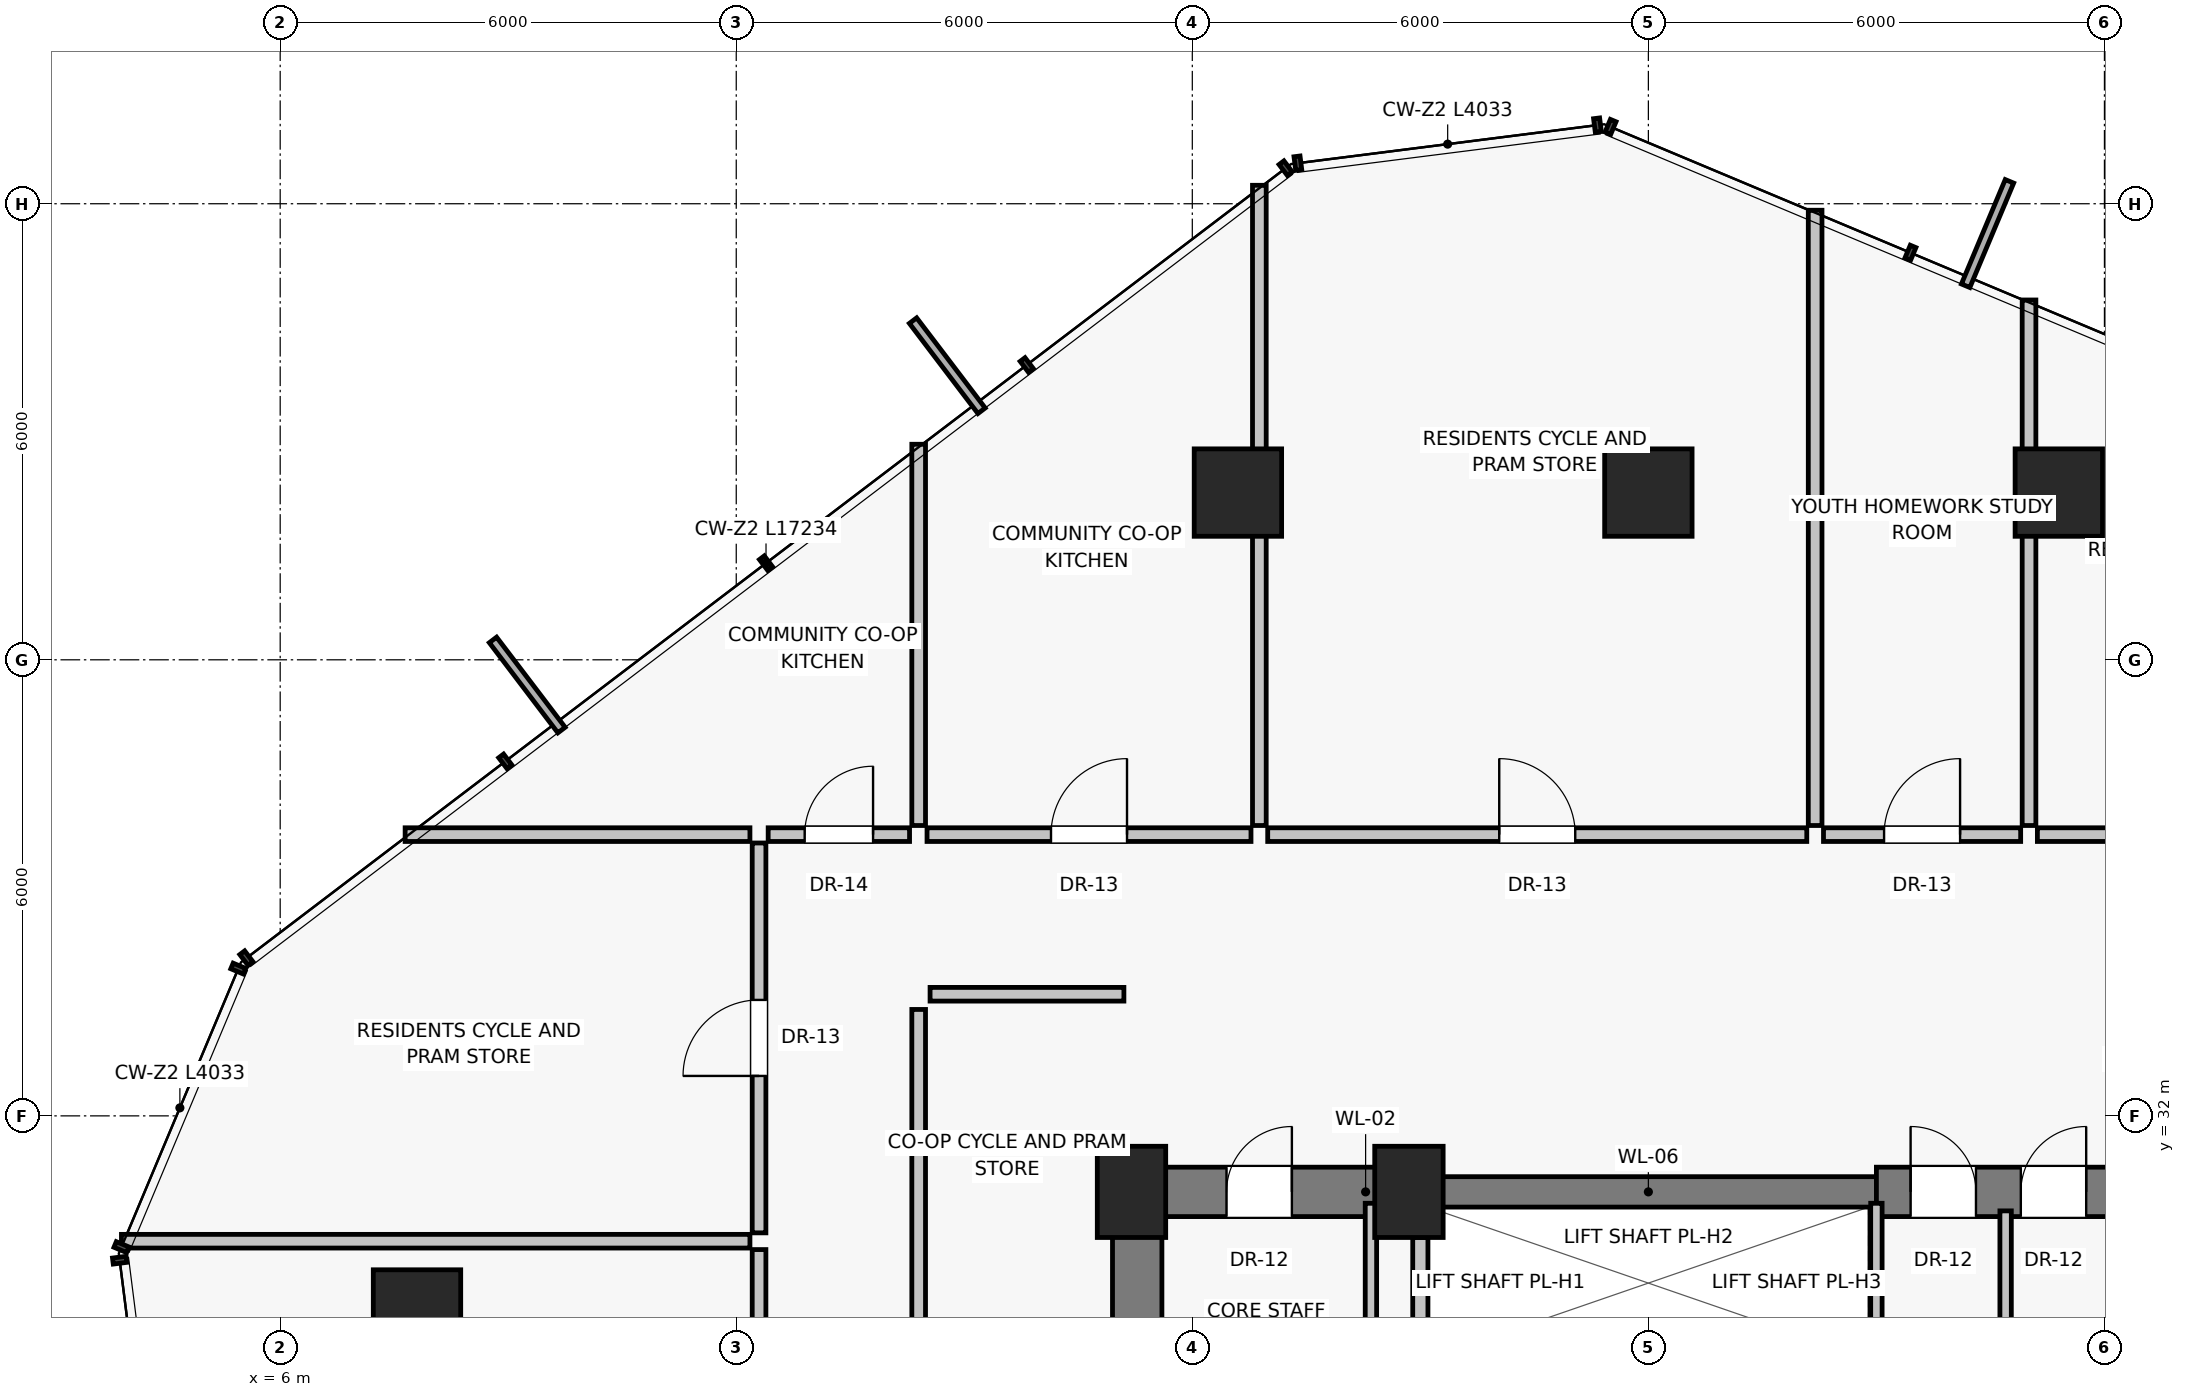
"""IFC4 building model, lengths in metres.
Left out: names, types, materials, properties, quantities, classifications, styles, units other than length and angle.
Written with IfcOpenShell. Run it as: python <this file> out.ifc"""

import sys

from ifc_helpers import new_model, si_unit, direction, frame, frame_2d, origin, origin_2d, place, context, subcontext, project, spatial, rectangle, extrude, source, transform, mapped, element, fill, save


model = new_model("IFC4")
c1 = context("Model", 3, precision=1e-05, world=origin(), true_north=direction((0.0, 1.0)))
c2 = subcontext(c1, "Body", "Model", "MODEL_VIEW")
j1 = project(units=[si_unit("LENGTHUNIT", "METRE"), si_unit("PLANEANGLEUNIT", "RADIAN")], contexts=[c1])
p1 = place(None, origin())
s1 = spatial("IfcSite", under=j1, at=p1, CompositionType="ELEMENT")
p2 = place(p1, origin())
s2 = spatial("IfcBuilding", under=s1, at=p2, CompositionType="ELEMENT")
p3 = place(p2, frame((0.0, 0.0, 152.25)))
s3 = spatial("IfcBuildingStorey", under=s2, at=p3, CompositionType="ELEMENT", Elevation=152.25)
for number, where, z_axis, x_axis in (
    (1, (17.2, 31.0, 0.0), (0.0, 0.0, 1.0), (1.0, 0.0, 0.0)),
    (2, (20.85, 31.0, 0.0), (0.0, 0.0, 1.0), (1.0, 0.0, 0.0)),
):
    element("IfcColumn", number, at=place(p3, frame(where, z_axis=z_axis, x_axis=x_axis)), inside=s3, PredefinedType="PILASTER", context=c2, shape_type="SweptSolid", body=[
        extrude(rectangle(XDim=0.9, YDim=1.2, at=origin_2d()), origin(), (0.0, 0.0, 1.0), 3.25),
    ])
for number, where, z_axis, x_axis in (
    (3, (29.4, 40.2, 0.0), (0.0, 0.0, 1.0), (1.0, 0.0, 0.0)),
    (4, (24.0, 40.2, 0.0), (0.0, 0.0, 1.0), (1.0, 0.0, 0.0)),
    (5, (18.6, 40.2, 0.0), (0.0, 0.0, 1.0), (1.0, 0.0, 0.0)),
    (6, (7.8, 29.4, 0.0), (0.0, 0.0, 1.0), (1.0, 0.0, 0.0)),
):
    element("IfcColumn", number, at=place(p3, frame(where, z_axis=z_axis, x_axis=x_axis)), inside=s3, PredefinedType="COLUMN", context=c2, shape_type="SweptSolid", body=[
        extrude(rectangle(XDim=1.15, YDim=1.15, at=origin_2d()), origin(), (0.0, 0.0, 1.0), 3.25),
    ])
p4 = place(p3, frame((17.275, 16.8, 0.0), z_axis=(0.0, 0.0, 1.0), x_axis=(0.0, 1.0, 0.0)))
e7 = element("IfcWall", 7, at=p4, inside=s3, PredefinedType="SHEAR", context=c2, shape_type="SweptSolid", body=[
    extrude(rectangle(XDim=14.2, YDim=0.65, at=frame_2d((7.1, 0.0))), origin(), (0.0, 0.0, 1.0), 3.0),
])
p5 = place(p3, frame((17.2, 31.0, 0.0), z_axis=(0.0, 0.0, 1.0), x_axis=(1.0, 0.0, 0.0)))
e8 = element("IfcWall", 8, at=p5, inside=s3, PredefinedType="SHEAR", context=c2, shape_type="SweptSolid", body=[
    extrude(rectangle(XDim=3.8, YDim=0.65, at=frame_2d((1.9, 0.0))), origin(), (0.0, 0.0, 1.0), 3.0),
])
p6 = place(p5, frame((1.25, 0.0, 0.0)))
e9 = element("IfcOpeningElement", 9, at=p6, cuts=e8, PredefinedType="OPENING", context=c2, shape_type="SweptSolid", body=[
    extrude(rectangle(XDim=0.86, YDim=2.01, at=frame_2d((0.43, 1.005))), frame((0.0, 0.335, 0.0), z_axis=(0.0, -1.0, 0.0), x_axis=(1.0, 0.0, 0.0)), (0.0, 0.0, 1.0), 0.67),
])
p7 = place(p3, frame((21.0, 31.0, 0.0), z_axis=(0.0, 0.0, 1.0), x_axis=(1.0, 0.0, 0.0)))
e10 = element("IfcWall", 10, at=p7, inside=s3, PredefinedType="SHEAR", context=c2, shape_type="SweptSolid", body=[
    extrude(rectangle(XDim=6.0, YDim=0.4, at=frame_2d((3.0, 0.0))), origin(), (0.0, 0.0, 1.0), 3.0),
])
p8 = place(p3, frame((27.0, 31.0, 0.0), z_axis=(0.0, 0.0, 1.0), x_axis=(1.0, 0.0, 0.0)))
e11 = element("IfcWall", 11, at=p8, inside=s3, PredefinedType="SHEAR", context=c2, shape_type="SweptSolid", body=[
    extrude(rectangle(XDim=3.8, YDim=0.65, at=frame_2d((1.9, 0.0))), origin(), (0.0, 0.0, 1.0), 3.0),
])
p9 = place(p8, frame((0.45, 0.0, 0.0)))
e12 = element("IfcOpeningElement", 12, at=p9, cuts=e11, PredefinedType="OPENING", context=c2, shape_type="SweptSolid", body=[
    extrude(rectangle(XDim=0.86, YDim=2.01, at=frame_2d((0.43, 1.005))), frame((0.0, 0.335, 0.0), z_axis=(0.0, -1.0, 0.0), x_axis=(1.0, 0.0, 0.0)), (0.0, 0.0, 1.0), 0.67),
])
p10 = place(p8, frame((1.9, 0.0, 0.0)))
e13 = element("IfcOpeningElement", 13, at=p10, cuts=e11, PredefinedType="OPENING", context=c2, shape_type="SweptSolid", body=[
    extrude(rectangle(XDim=0.86, YDim=2.01, at=frame_2d((0.43, 1.005))), frame((0.0, 0.335, 0.0), z_axis=(0.0, -1.0, 0.0), x_axis=(1.0, 0.0, 0.0)), (0.0, 0.0, 1.0), 0.67),
])
for number, where, z_axis, x_axis in (
    (14, (20.35, 28.65, 0.0), (0.0, 0.0, 1.0), (0.0, 1.0, 0.0)),
    (15, (27.0, 28.65, 0.0), (0.0, 0.0, 1.0), (0.0, 1.0, 0.0)),
):
    element("IfcWall", number, at=place(p3, frame(where, z_axis=z_axis, x_axis=x_axis)), inside=s3, PredefinedType="PARTITIONING", context=c2, shape_type="SweptSolid", body=[
        extrude(rectangle(XDim=2.2, YDim=0.15, at=frame_2d((1.1, 0.0))), origin(), (0.0, 0.0, 1.0), 3.0),
    ])
p11 = place(p3, frame((21.0, 28.8, 0.0), z_axis=(0.0, 0.0, 1.0), x_axis=(0.0, 1.0, 0.0)))
e16 = element("IfcWall", 16, at=p11, inside=s3, PredefinedType="SOLIDWALL", context=c2, shape_type="SweptSolid", body=[
    extrude(rectangle(XDim=1.6, YDim=0.2, at=frame_2d((0.8, 0.0))), origin(), (0.0, 0.0, 1.0), 3.0),
])
p12 = place(p3, frame((28.7, 28.75, 0.0), z_axis=(0.0, 0.0, 1.0), x_axis=(0.0, 1.0, 0.0)))
e17 = element("IfcWall", 17, at=p12, inside=s3, PredefinedType="PARTITIONING", context=c2, shape_type="SweptSolid", body=[
    extrude(rectangle(XDim=2.0, YDim=0.15, at=frame_2d((1.0, 0.0))), origin(), (0.0, 0.0, 1.0), 3.0),
])
p13 = place(p3, frame((14.4, 24.2, 0.0), z_axis=(0.0, 0.0, 1.0), x_axis=(0.0, 1.0, 0.0)))
e18 = element("IfcWall", 18, at=p13, inside=s3, PredefinedType="PARTITIONING", context=c2, shape_type="SweptSolid", body=[
    extrude(rectangle(XDim=9.2, YDim=0.18, at=frame_2d((4.6, 0.0))), origin(), (0.0, 0.0, 1.0), 3.0),
])
p14 = place(p13, frame((3.8, 0.0, 0.0)))
e19 = element("IfcOpeningElement", 19, at=p14, cuts=e18, PredefinedType="OPENING", context=c2, shape_type="SweptSolid", body=[
    extrude(rectangle(XDim=0.9, YDim=2.01, at=frame_2d((0.45, 1.005))), frame((0.0, 0.1, 0.0), z_axis=(0.0, -1.0, 0.0), x_axis=(1.0, 0.0, 0.0)), (0.0, 0.0, 1.0), 0.2),
])
p15 = place(p3, frame((14.55, 33.6, 0.0), z_axis=(0.0, 0.0, 1.0), x_axis=(1.0, 0.0, 0.0)))
e20 = element("IfcWall", 20, at=p15, inside=s3, PredefinedType="PARTITIONING", context=c2, shape_type="SweptSolid", body=[
    extrude(rectangle(XDim=2.55, YDim=0.18, at=frame_2d((1.275, 0.0))), origin(), (0.0, 0.0, 1.0), 3.0),
])
p16 = place(p3, frame((14.4, 35.82, 0.0), z_axis=(0.0, 0.0, 1.0), x_axis=(0.0, 1.0, 0.0)))
e21 = element("IfcWall", 21, at=p16, inside=s3, PredefinedType="PARTITIONING", context=c2, shape_type="SweptSolid", body=[
    extrude(rectangle(XDim=5.016, YDim=0.18, at=frame_2d((2.508, 0.0))), origin(), (0.0, 0.0, 1.0), 3.0),
])
p17 = place(p3, frame((14.51, 35.7, 0.0), z_axis=(0.0, 0.0, 1.0), x_axis=(1.0, 0.0, 0.0)))
e22 = element("IfcWall", 22, at=p17, inside=s3, PredefinedType="PARTITIONING", context=c2, shape_type="SweptSolid", body=[
    extrude(rectangle(XDim=4.262, YDim=0.18, at=frame_2d((2.131, 0.0))), origin(), (0.0, 0.0, 1.0), 2.58),
])
p18 = place(p17, frame((1.631, 0.0, 0.0)))
e23 = element("IfcOpeningElement", 23, at=p18, cuts=e22, PredefinedType="OPENING", context=c2, shape_type="SweptSolid", body=[
    extrude(rectangle(XDim=1.0, YDim=2.01, at=frame_2d((0.5, 1.005))), frame((0.0, 0.1, 0.0), z_axis=(0.0, -1.0, 0.0), x_axis=(1.0, 0.0, 0.0)), (0.0, 0.0, 1.0), 0.2),
])
p19 = place(p3, frame((18.992, 35.7, 0.0), z_axis=(0.0, 0.0, 1.0), x_axis=(1.0, 0.0, 0.0)))
e24 = element("IfcWall", 24, at=p19, inside=s3, PredefinedType="PARTITIONING", context=c2, shape_type="SweptSolid", body=[
    extrude(rectangle(XDim=7.092, YDim=0.18, at=frame_2d((3.546, 0.0))), origin(), (0.0, 0.0, 1.0), 2.58),
])
p20 = place(p19, frame((3.046, 0.0, 0.0)))
e25 = element("IfcOpeningElement", 25, at=p20, cuts=e24, PredefinedType="OPENING", context=c2, shape_type="SweptSolid", body=[
    extrude(rectangle(XDim=1.0, YDim=2.01, at=frame_2d((0.5, 1.005))), frame((0.0, 0.1, 0.0), z_axis=(0.0, -1.0, 0.0), x_axis=(1.0, 0.0, 0.0)), (0.0, 0.0, 1.0), 0.2),
])
p21 = place(p3, frame((18.882, 35.82, 0.0), z_axis=(0.0, 0.0, 1.0), x_axis=(0.0, 1.0, 0.0)))
e26 = element("IfcWall", 26, at=p21, inside=s3, PredefinedType="PARTITIONING", context=c2, shape_type="SweptSolid", body=[
    extrude(rectangle(XDim=8.423, YDim=0.18, at=frame_2d((4.211, 0.0))), origin(), (0.0, 0.0, 1.0), 2.378),
])
p22 = place(p3, frame((26.194, 35.82, 0.0), z_axis=(0.0, 0.0, 1.0), x_axis=(0.0, 1.0, 0.0)))
e27 = element("IfcWall", 27, at=p22, inside=s3, PredefinedType="PARTITIONING", context=c2, shape_type="SweptSolid", body=[
    extrude(rectangle(XDim=8.094, YDim=0.18, at=frame_2d((4.047, 0.0))), origin(), (0.0, 0.0, 1.0), 3.0),
])
p23 = place(p3, frame((26.304, 35.7, 0.0), z_axis=(0.0, 0.0, 1.0), x_axis=(1.0, 0.0, 0.0)))
e28 = element("IfcWall", 28, at=p23, inside=s3, PredefinedType="PARTITIONING", context=c2, shape_type="SweptSolid", body=[
    extrude(rectangle(XDim=2.594, YDim=0.18, at=frame_2d((1.297, 0.0))), origin(), (0.0, 0.0, 1.0), 2.58),
])
p24 = place(p23, frame((0.797, 0.0, 0.0)))
e29 = element("IfcOpeningElement", 29, at=p24, cuts=e28, PredefinedType="OPENING", context=c2, shape_type="SweptSolid", body=[
    extrude(rectangle(XDim=1.0, YDim=2.01, at=frame_2d((0.5, 1.005))), frame((0.0, 0.1, 0.0), z_axis=(0.0, -1.0, 0.0), x_axis=(1.0, 0.0, 0.0)), (0.0, 0.0, 1.0), 0.2),
])
p25 = place(p3, frame((29.118, 35.7, 0.0), z_axis=(0.0, 0.0, 1.0), x_axis=(1.0, 0.0, 0.0)))
e30 = element("IfcWall", 30, at=p25, inside=s3, PredefinedType="PARTITIONING", context=c2, shape_type="SweptSolid", body=[
    extrude(rectangle(XDim=4.372, YDim=0.18, at=frame_2d((2.186, 0.0))), origin(), (0.0, 0.0, 1.0), 2.58),
])
p26 = place(p25, frame((1.686, 0.0, 0.0)))
e31 = element("IfcOpeningElement", 31, at=p26, cuts=e30, PredefinedType="OPENING", context=c2, shape_type="SweptSolid", body=[
    extrude(rectangle(XDim=1.0, YDim=2.01, at=frame_2d((0.5, 1.005))), frame((0.0, 0.1, 0.0), z_axis=(0.0, -1.0, 0.0), x_axis=(1.0, 0.0, 0.0)), (0.0, 0.0, 1.0), 0.2),
])
p27 = place(p3, frame((29.008, 35.82, 0.0), z_axis=(0.0, 0.0, 1.0), x_axis=(0.0, 1.0, 0.0)))
e32 = element("IfcWall", 32, at=p27, inside=s3, PredefinedType="PARTITIONING", context=c2, shape_type="SweptSolid", body=[
    extrude(rectangle(XDim=6.914, YDim=0.18, at=frame_2d((3.457, 0.0))), origin(), (0.0, 0.0, 1.0), 2.378),
])
p28 = place(p3, frame((12.18, 35.7, 0.0), z_axis=(0.0, 0.0, 1.0), x_axis=(-1.0, 0.0, 0.0)))
e33 = element("IfcWall", 33, at=p28, inside=s3, PredefinedType="PARTITIONING", context=c2, shape_type="SweptSolid", body=[
    extrude(rectangle(XDim=4.536, YDim=0.18, at=frame_2d((2.268, 0.0))), origin(), (0.0, 0.0, 1.0), 3.0),
])
p29 = place(p3, frame((12.3, 27.182, 0.0), z_axis=(0.0, 0.0, 1.0), x_axis=(0.0, 1.0, 0.0)))
e34 = element("IfcWall", 34, at=p29, inside=s3, PredefinedType="PARTITIONING", context=c2, shape_type="SweptSolid", body=[
    extrude(rectangle(XDim=3.059, YDim=0.18, at=frame_2d((1.53, 0.0))), origin(), (0.0, 0.0, 1.0), 2.58),
])
p30 = place(p29, frame((1.03, 0.0, 0.0)))
e35 = element("IfcOpeningElement", 35, at=p30, cuts=e34, PredefinedType="OPENING", context=c2, shape_type="SweptSolid", body=[
    extrude(rectangle(XDim=1.0, YDim=2.01, at=frame_2d((0.5, 1.005))), frame((0.0, 0.1, 0.0), z_axis=(0.0, -1.0, 0.0), x_axis=(1.0, 0.0, 0.0)), (0.0, 0.0, 1.0), 0.2),
])
p31 = place(p3, frame((12.3, 30.461, 0.0), z_axis=(0.0, 0.0, 1.0), x_axis=(0.0, 1.0, 0.0)))
e36 = element("IfcWall", 36, at=p31, inside=s3, PredefinedType="PARTITIONING", context=c2, shape_type="SweptSolid", body=[
    extrude(rectangle(XDim=5.129, YDim=0.18, at=frame_2d((2.564, 0.0))), origin(), (0.0, 0.0, 1.0), 3.0),
])
p32 = place(p31, frame((2.064, 0.0, 0.0)))
e37 = element("IfcOpeningElement", 37, at=p32, cuts=e36, PredefinedType="OPENING", context=c2, shape_type="SweptSolid", body=[
    extrude(rectangle(XDim=1.0, YDim=2.01, at=frame_2d((0.5, 1.005))), frame((0.0, 0.1, 0.0), z_axis=(0.0, -1.0, 0.0), x_axis=(1.0, 0.0, 0.0)), (0.0, 0.0, 1.0), 0.2),
])
p33 = place(p3, frame((12.18, 30.351, 0.0), z_axis=(0.0, 0.0, 1.0), x_axis=(-1.0, 0.0, 0.0)))
e38 = element("IfcWall", 38, at=p33, inside=s3, PredefinedType="PARTITIONING", context=c2, shape_type="SweptSolid", body=[
    extrude(rectangle(XDim=8.268, YDim=0.18, at=frame_2d((4.134, 0.0))), origin(), (0.0, 0.0, 1.0), 2.378),
])
p34 = place(p3, frame((12.42, 35.7, 0.0), z_axis=(0.0, 0.0, 1.0), x_axis=(1.0, 0.0, 0.0)))
e39 = element("IfcWall", 39, at=p34, inside=s3, PredefinedType="PARTITIONING", context=c2, shape_type="SweptSolid", body=[
    extrude(rectangle(XDim=1.86, YDim=0.18, at=frame_2d((0.93, 0.0))), origin(), (0.0, 0.0, 1.0), 3.0),
])
p35 = place(p34, frame((0.48, 0.0, 0.0)))
e40 = element("IfcOpeningElement", 40, at=p35, cuts=e39, PredefinedType="OPENING", context=c2, shape_type="SweptSolid", body=[
    extrude(rectangle(XDim=0.9, YDim=2.01, at=frame_2d((0.45, 1.005))), frame((0.0, 0.1, 0.0), z_axis=(0.0, -1.0, 0.0), x_axis=(1.0, 0.0, 0.0)), (0.0, 0.0, 1.0), 0.2),
])
m1 = source(origin(), c2, "Body", "SweptSolid", [
    extrude(rectangle(XDim=0.86, YDim=2.01, at=frame_2d((0.43, 1.005))), frame((0.0, 0.025, 0.0), z_axis=(0.0, -1.0, 0.0), x_axis=(1.0, 0.0, 0.0)), (0.0, 0.0, 1.0), 0.05),
])
p36 = place(p6, origin())
e41 = element("IfcDoor", 41, at=p36, inside=s3, OperationType="SINGLE_SWING_RIGHT", PredefinedType="DOOR", context=c2, shape_type="MappedRepresentation", body=[
    mapped(m1, transform((0.0, 0.0, 0.0), scale=1.0)),
])
fill(e9, e41)
p37 = place(p9, origin())
e42 = element("IfcDoor", 42, at=p37, inside=s3, OperationType="SINGLE_SWING_LEFT", PredefinedType="DOOR", context=c2, shape_type="MappedRepresentation", body=[
    mapped(m1, transform((0.0, 0.0, 0.0), scale=1.0)),
])
fill(e12, e42)
p38 = place(p10, origin())
e43 = element("IfcDoor", 43, at=p38, inside=s3, OperationType="SINGLE_SWING_RIGHT", PredefinedType="DOOR", context=c2, shape_type="MappedRepresentation", body=[
    mapped(m1, transform((0.0, 0.0, 0.0), scale=1.0)),
])
fill(e13, e43)
m2 = source(origin(), c2, "Body", "SweptSolid", [
    extrude(rectangle(XDim=1.0, YDim=2.01, at=frame_2d((0.5, 1.005))), frame((0.0, 0.025, 0.0), z_axis=(0.0, -1.0, 0.0), x_axis=(1.0, 0.0, 0.0)), (0.0, 0.0, 1.0), 0.05),
])
p39 = place(p18, origin())
e44 = element("IfcDoor", 44, at=p39, inside=s3, OperationType="SINGLE_SWING_RIGHT", PredefinedType="DOOR", context=c2, shape_type="MappedRepresentation", body=[
    mapped(m2, transform((0.0, 0.0, 0.0), scale=1.0)),
])
fill(e23, e44)
p40 = place(p20, origin())
e45 = element("IfcDoor", 45, at=p40, inside=s3, OperationType="SINGLE_SWING_LEFT", PredefinedType="DOOR", context=c2, shape_type="MappedRepresentation", body=[
    mapped(m2, transform((0.0, 0.0, 0.0), scale=1.0)),
])
fill(e25, e45)
p41 = place(p24, origin())
e46 = element("IfcDoor", 46, at=p41, inside=s3, OperationType="SINGLE_SWING_RIGHT", PredefinedType="DOOR", context=c2, shape_type="MappedRepresentation", body=[
    mapped(m2, transform((0.0, 0.0, 0.0), scale=1.0)),
])
fill(e29, e46)
p42 = place(p32, origin())
e47 = element("IfcDoor", 47, at=p42, inside=s3, OperationType="SINGLE_SWING_LEFT", PredefinedType="DOOR", context=c2, shape_type="MappedRepresentation", body=[
    mapped(m2, transform((0.0, 0.0, 0.0), scale=1.0)),
])
fill(e37, e47)
m3 = source(origin(), c2, "Body", "SweptSolid", [
    extrude(rectangle(XDim=0.9, YDim=2.01, at=frame_2d((0.45, 1.005))), frame((0.0, 0.025, 0.0), z_axis=(0.0, -1.0, 0.0), x_axis=(1.0, 0.0, 0.0)), (0.0, 0.0, 1.0), 0.05),
])
p43 = place(p35, origin())
e48 = element("IfcDoor", 48, at=p43, inside=s3, OperationType="SINGLE_SWING_RIGHT", PredefinedType="DOOR", context=c2, shape_type="MappedRepresentation", body=[
    mapped(m3, transform((0.0, 0.0, 0.0), scale=1.0)),
])
fill(e40, e48)
save(model, sys.argv[1])
